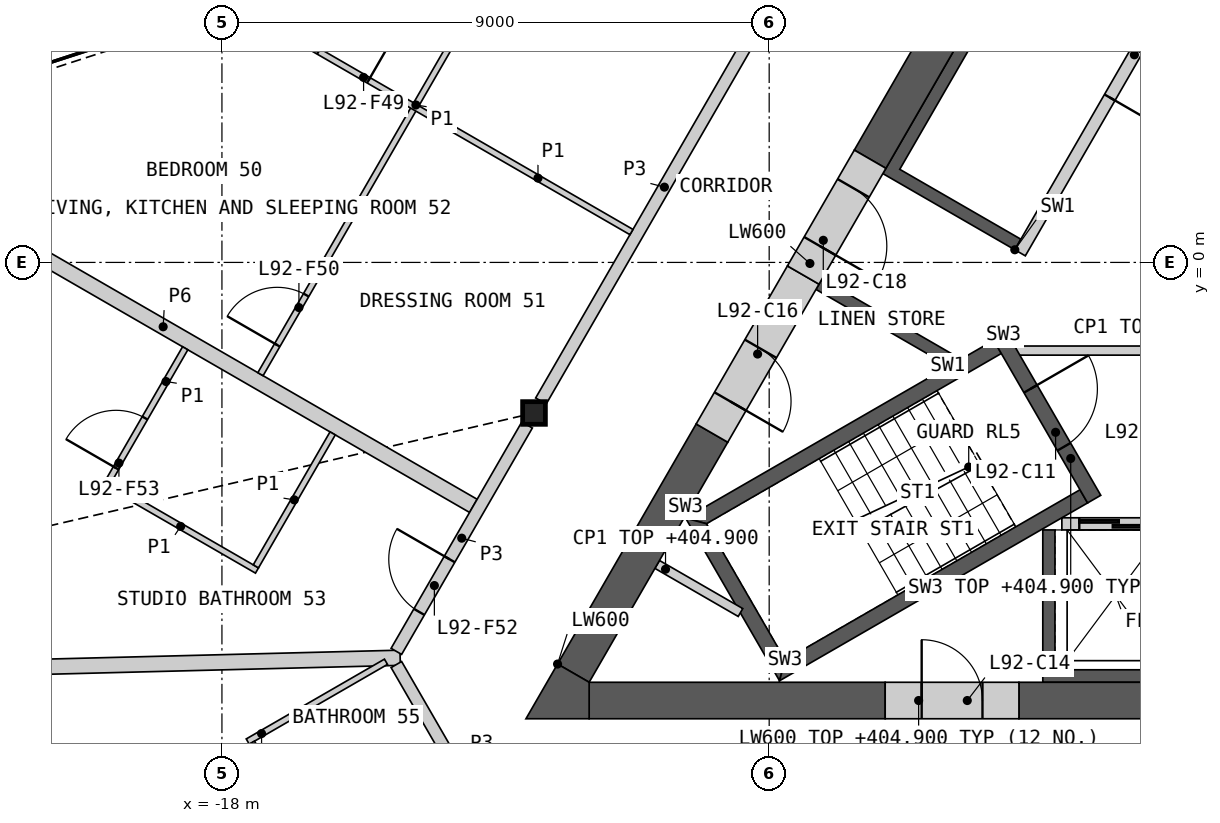
"""IFC4 building model, lengths in metres.
Left out: names, types, materials, properties, quantities, classifications, styles, units other than length and angle.
Written with IfcOpenShell. Run it as: python <this file> out.ifc"""

import sys

from ifc_helpers import new_model, si_unit, direction, frame, frame_2d, origin, origin_2d, place, context, subcontext, project, spatial, polyline, rectangle, i_section, outline, extrude, element, fill, save


model = new_model("IFC4")
c1 = context("Model", 3, precision=1e-05, world=origin(), true_north=direction((0.0, 1.0)))
c2 = subcontext(c1, "Body", "Model", "MODEL_VIEW")
j1 = project(units=[si_unit("LENGTHUNIT", "METRE"), si_unit("PLANEANGLEUNIT", "RADIAN")], contexts=[c1])
p1 = place(None, origin())
s1 = spatial("IfcSite", under=j1, at=p1, CompositionType="ELEMENT")
p2 = place(p1, origin())
s2 = spatial("IfcBuilding", under=s1, at=p2, CompositionType="ELEMENT")
p3 = place(p2, frame((0.0, 0.0, 401.8)))
s3 = spatial("IfcBuildingStorey", under=s2, at=p3, CompositionType="ELEMENT", Elevation=401.8)
p4 = place(p3, frame((-12.868, -2.476, 0.0), z_axis=(0.0, 0.0, 1.0), x_axis=(1.0, 0.0, 0.0)))
e1 = element("IfcColumn", 1, at=p4, inside=s3, PredefinedType="COLUMN", context=c2, shape_type="SweptSolid", body=[
    extrude(i_section(OverallWidth=0.374, OverallDepth=0.372, WebThickness=0.016, FlangeThickness=0.026, at=origin_2d()), origin(), (0.0, 0.0, 1.0), 3.4),
])
p5 = place(p3, origin())
e2 = element("IfcWall", 2, at=p5, inside=s3, PredefinedType="SHEAR", context=c2, shape_type="SweptSolid", body=[
    extrude(outline(polyline([(4.5, -4.4), (4.5, -6.906), (-4.5, -6.906), (-4.5, -4.4), (-4.3, -4.4), (-4.3, -6.7), (-2.3, -6.7), (-2.3, -4.4), (-2.1, -4.4), (-2.1, -6.7), (-0.1, -6.7), (-0.1, -4.4), (0.1, -4.4), (0.1, -6.7), (2.1, -6.7), (2.1, -4.4), (2.3, -4.4), (2.3, -6.7), (4.3, -6.7), (4.3, -4.4), (4.5, -4.4)])), origin(), (0.0, 0.0, 1.0), 3.1),
])
p6 = place(p3, frame((-4.187, -4.3, 0.0), z_axis=(0.0, 0.0, 1.0), x_axis=(1.0, 0.0, 0.0)))
e3 = element("IfcWall", 3, at=p6, inside=s3, PredefinedType="SOLIDWALL", context=c2, shape_type="SweptSolid", body=[
    extrude(rectangle(XDim=8.373, YDim=0.2, at=frame_2d((4.187, 0.0))), origin(), (0.0, 0.0, 1.0), 3.1),
])
p7 = place(p6, frame((0.287, 0.0, 0.0)))
e4 = element("IfcOpeningElement", 4, at=p7, cuts=e3, PredefinedType="OPENING", context=c2, shape_type="SweptSolid", body=[
    extrude(rectangle(XDim=1.2, YDim=2.1, at=frame_2d((0.6, 1.05))), frame((0.0, 0.11, 0.0), z_axis=(0.0, -1.0, 0.0), x_axis=(1.0, 0.0, 0.0)), (0.0, 0.0, 1.0), 0.22),
])
p8 = place(p6, frame((2.387, 0.0, 0.0)))
e5 = element("IfcOpeningElement", 5, at=p8, cuts=e3, PredefinedType="OPENING", context=c2, shape_type="SweptSolid", body=[
    extrude(rectangle(XDim=1.4, YDim=2.1, at=frame_2d((0.7, 1.05))), frame((0.0, 0.11, 0.0), z_axis=(0.0, -1.0, 0.0), x_axis=(1.0, 0.0, 0.0)), (0.0, 0.0, 1.0), 0.22),
])
p9 = place(p6, frame((4.737, 0.0, 0.0)))
e6 = element("IfcOpeningElement", 6, at=p9, cuts=e3, PredefinedType="OPENING", context=c2, shape_type="SweptSolid", body=[
    extrude(rectangle(XDim=1.1, YDim=2.1, at=frame_2d((0.55, 1.05))), frame((0.0, 0.11, 0.0), z_axis=(0.0, -1.0, 0.0), x_axis=(1.0, 0.0, 0.0)), (0.0, 0.0, 1.0), 0.22),
])
p10 = place(p6, frame((6.887, 0.0, 0.0)))
e7 = element("IfcOpeningElement", 7, at=p10, cuts=e3, PredefinedType="OPENING", context=c2, shape_type="SweptSolid", body=[
    extrude(rectangle(XDim=1.2, YDim=2.1, at=frame_2d((0.6, 1.05))), frame((0.0, 0.11, 0.0), z_axis=(0.0, -1.0, 0.0), x_axis=(1.0, 0.0, 0.0)), (0.0, 0.0, 1.0), 0.22),
])
p11 = place(p3, origin())
e8 = element("IfcWall", 8, at=p11, inside=s3, PredefinedType="SHEAR", context=c2, shape_type="SweptSolid", body=[
    extrude(outline(polyline([(-6.061, -1.697), (-8.231, -0.444), (-8.131, -0.271), (-5.96, -1.524), (-6.061, -1.697)])), origin(), (0.0, 0.0, 1.0), 3.1),
])
p12 = place(p3, origin())
e9 = element("IfcWall", 9, at=p12, inside=s3, PredefinedType="SHEAR", context=c2, shape_type="SweptSolid", body=[
    extrude(outline(polyline([(-4.96, 0.208), (-7.131, 1.461), (-3.731, 7.35), (-1.561, 6.097), (-1.66, 5.924), (-3.652, 7.074), (-6.852, 1.531), (-4.861, 0.381), (-4.96, 0.208)])), origin(), (0.0, 0.0, 1.0), 3.1),
])
p13 = place(p3, frame((-1.631, 5.776, 0.0), z_axis=(0.0, 0.0, 1.0), x_axis=(-0.499992876559, -0.866029516466, 0.0)))
e10 = element("IfcWall", 10, at=p13, inside=s3, PredefinedType="SOLIDWALL", context=c2, shape_type="SweptSolid", body=[
    extrude(rectangle(XDim=6.486, YDim=0.2, at=frame_2d((3.243, 0.0))), origin(), (0.0, 0.0, 1.0), 3.1),
])
p14 = place(p13, frame((2.637, 0.0, 0.0)))
e11 = element("IfcOpeningElement", 11, at=p14, cuts=e10, PredefinedType="OPENING", context=c2, shape_type="SweptSolid", body=[
    extrude(rectangle(XDim=0.9, YDim=2.1, at=frame_2d((0.45, 1.05))), frame((0.0, 0.11, 0.0), z_axis=(0.0, -1.0, 0.0), x_axis=(1.0, 0.0, 0.0)), (0.0, 0.0, 1.0), 0.22),
])
p15 = place(p3, frame((-4.941, -1.45, 0.0), z_axis=(0.0, 0.0, 1.0), x_axis=(1.0, 0.0, 0.0)))
e12 = element("IfcWall", 12, at=p15, inside=s3, PredefinedType="PARTITIONING", context=c2, shape_type="SweptSolid", body=[
    extrude(rectangle(XDim=9.882, YDim=0.15, at=frame_2d((4.941, 0.0))), origin(), (0.0, 0.0, 1.0), 3.1),
])
p16 = place(p15, frame((4.391, 0.0, 0.0)))
e13 = element("IfcOpeningElement", 13, at=p16, cuts=e12, PredefinedType="OPENING", context=c2, shape_type="SweptSolid", body=[
    extrude(rectangle(XDim=1.1, YDim=2.1, at=frame_2d((0.55, 1.05))), frame((0.0, 0.085, 0.0), z_axis=(0.0, -1.0, 0.0), x_axis=(1.0, 0.0, 0.0)), (0.0, 0.0, 1.0), 0.17),
])
p17 = place(p3, origin())
e14 = element("IfcWall", 14, at=p17, inside=s3, PredefinedType="SHEAR", context=c2, shape_type="SweptSolid", body=[
    extrude(outline(polyline([(-5.307, -1.281), (-10.374, -4.206), (-10.032, -4.298), (-5.182, -1.498), (-5.307, -1.281)])), origin(), (0.0, 0.0, 1.0), 3.1),
])
p18 = place(p3, origin())
e15 = element("IfcWall", 15, at=p18, inside=s3, PredefinedType="SHEAR", context=c2, shape_type="SweptSolid", body=[
    extrude(outline(polyline([(-10.374, -4.206), (-8.83, -6.881), (-8.738, -6.539), (-10.032, -4.298), (-10.374, -4.206)])), origin(), (0.0, 0.0, 1.0), 3.1),
])
p19 = place(p3, origin())
e16 = element("IfcWall", 16, at=p19, inside=s3, PredefinedType="SHEAR", context=c2, shape_type="SweptSolid", body=[
    extrude(outline(polyline([(-8.738, -6.539), (-8.83, -6.881), (-3.763, -3.956), (-3.888, -3.739), (-8.738, -6.539)])), origin(), (0.0, 0.0, 1.0), 3.1),
])
p20 = place(p3, frame((-5.199, -1.219, 0.0), z_axis=(0.0, 0.0, 1.0), x_axis=(0.499982516597, -0.866035497597, 0.0)))
e17 = element("IfcWall", 17, at=p20, inside=s3, PredefinedType="SHEAR", context=c2, shape_type="SweptSolid", body=[
    extrude(rectangle(XDim=3.088, YDim=0.25, at=frame_2d((1.544, 0.0))), origin(), (0.0, 0.0, 1.0), 3.1),
])
p21 = place(p20, frame((0.994, 0.0, 0.0)))
e18 = element("IfcOpeningElement", 18, at=p21, cuts=e17, PredefinedType="OPENING", context=c2, shape_type="SweptSolid", body=[
    extrude(rectangle(XDim=1.1, YDim=2.1, at=frame_2d((0.55, 1.05))), frame((0.0, 0.135, 0.0), z_axis=(0.0, -1.0, 0.0), x_axis=(1.0, 0.0, 0.0)), (0.0, 0.0, 1.0), 0.27),
])
p22 = place(p3, frame((-10.842, -4.967, 0.0), z_axis=(0.0, 0.0, 1.0), x_axis=(0.866098216386, -0.499873863663, 0.0)))
e19 = element("IfcWall", 19, at=p22, inside=s3, PredefinedType="PARTITIONING", context=c2, shape_type="SweptSolid", body=[
    extrude(rectangle(XDim=1.582, YDim=0.15, at=frame_2d((0.791, 0.0))), origin(), (0.0, 0.0, 1.0), 3.1),
])
p23 = place(p3, frame((-4.892, -7.206, 0.0), z_axis=(0.0, 0.0, 1.0), x_axis=(1.0, 0.0, 0.0)))
e20 = element("IfcWall", 20, at=p23, inside=s3, PredefinedType="SHEAR", context=c2, shape_type="SweptSolid", body=[
    extrude(rectangle(XDim=16.853, YDim=0.6, at=frame_2d((8.426, 0.0))), origin(), (0.0, 0.0, 1.0), 3.1),
])
p24 = place(p3, frame((-11.961, -7.206, 0.0), z_axis=(0.0, 0.0, 1.0), x_axis=(1.0, 0.0, 0.0)))
e21 = element("IfcWall", 21, at=p24, inside=s3, PredefinedType="SHEAR", context=c2, shape_type="SweptSolid", body=[
    extrude(rectangle(XDim=4.868, YDim=0.6, at=frame_2d((2.434, 0.0))), origin(), (0.0, 0.0, 1.0), 3.1),
])
p25 = place(p3, frame((-3.794, 7.84, 0.0), z_axis=(0.0, 0.0, 1.0), x_axis=(-0.499974747889, -0.866039982607, 0.0)))
e22 = element("IfcWall", 22, at=p25, inside=s3, PredefinedType="SHEAR", context=c2, shape_type="SweptSolid", body=[
    extrude(rectangle(XDim=7.092, YDim=0.6, at=frame_2d((3.546, 0.0))), origin(), (0.0, 0.0, 1.0), 3.1),
])
p26 = place(p3, frame((-9.941, -2.807, 0.0), z_axis=(0.0, 0.0, 1.0), x_axis=(-0.500020646047, -0.866013483456, 0.0)))
e23 = element("IfcWall", 23, at=p26, inside=s3, PredefinedType="SHEAR", context=c2, shape_type="SweptSolid", body=[
    extrude(rectangle(XDim=4.559, YDim=0.6, at=frame_2d((2.28, 0.0))), origin(), (0.0, 0.0, 1.0), 3.1),
])
p27 = place(p3, origin())
e24 = element("IfcWall", 24, at=p27, inside=s3, PredefinedType="SHEAR", context=c2, shape_type="SweptSolid", body=[
    extrude(outline(polyline([(-12.48, -6.606), (-11.961, -6.906), (-11.961, -7.506), (-13.0, -7.506), (-12.48, -6.606)])), origin(), (0.0, 0.0, 1.0), 3.1),
])
p28 = place(p3, frame((-7.092, -7.206, 0.0), z_axis=(0.0, 0.0, 1.0), x_axis=(1.0, 0.0, 0.0)))
e25 = element("IfcWall", 25, at=p28, inside=s3, PredefinedType="SHEAR", context=c2, shape_type="SweptSolid", body=[
    extrude(rectangle(XDim=2.2, YDim=0.6, at=frame_2d((1.1, 0.0))), origin(), (0.0, 0.0, 1.0), 3.1),
])
p29 = place(p28, frame((0.6, 0.0, 0.0)))
e26 = element("IfcOpeningElement", 26, at=p29, cuts=e25, PredefinedType="OPENING", context=c2, shape_type="SweptSolid", body=[
    extrude(rectangle(XDim=1.0, YDim=2.1, at=frame_2d((0.5, 1.05))), frame((0.0, 0.31, 0.0), z_axis=(0.0, -1.0, 0.0), x_axis=(1.0, 0.0, 0.0)), (0.0, 0.0, 1.0), 0.62),
])
p30 = place(p3, frame((-8.44, -0.208, 0.0), z_axis=(0.0, 0.0, 1.0), x_axis=(-0.499997052475, -0.866027105532, 0.0)))
e27 = element("IfcWall", 27, at=p30, inside=s3, PredefinedType="SHEAR", context=c2, shape_type="SweptSolid", body=[
    extrude(rectangle(XDim=3.001, YDim=0.6, at=frame_2d((1.501, 0.0))), origin(), (0.0, 0.0, 1.0), 3.1),
])
p31 = place(p30, frame((1.4, 0.0, 0.0)))
e28 = element("IfcOpeningElement", 28, at=p31, cuts=e27, PredefinedType="OPENING", context=c2, shape_type="SweptSolid", body=[
    extrude(rectangle(XDim=1.0, YDim=2.1, at=frame_2d((0.5, 1.05))), frame((0.0, 0.31, 0.0), z_axis=(0.0, -1.0, 0.0), x_axis=(1.0, 0.0, 0.0)), (0.0, 0.0, 1.0), 0.62),
])
p32 = place(p3, frame((-7.34, 1.698, 0.0), z_axis=(0.0, 0.0, 1.0), x_axis=(-0.50002983664, -0.866008176907, 0.0)))
e29 = element("IfcWall", 29, at=p32, inside=s3, PredefinedType="SHEAR", context=c2, shape_type="SweptSolid", body=[
    extrude(rectangle(XDim=2.2, YDim=0.6, at=frame_2d((1.1, 0.0))), origin(), (0.0, 0.0, 1.0), 3.1),
])
p33 = place(p32, frame((0.55, 0.0, 0.0)))
e30 = element("IfcOpeningElement", 30, at=p33, cuts=e29, PredefinedType="OPENING", context=c2, shape_type="SweptSolid", body=[
    extrude(rectangle(XDim=1.1, YDim=2.1, at=frame_2d((0.55, 1.05))), frame((0.0, 0.31, 0.0), z_axis=(0.0, -1.0, 0.0), x_axis=(1.0, 0.0, 0.0)), (0.0, 0.0, 1.0), 0.62),
])
p34 = place(p3, frame((-29.269, -6.862, 0.0), z_axis=(0.0, 0.0, 1.0), x_axis=(0.999679020594, 0.025334872878, 0.0)))
e31 = element("IfcWall", 31, at=p34, inside=s3, PredefinedType="PARTITIONING", context=c2, shape_type="SweptSolid", body=[
    extrude(rectangle(XDim=14.204, YDim=0.25, at=frame_2d((7.102, 0.0))), origin(), (0.0, 0.0, 1.0), 2.33),
])
p35 = place(p3, frame((-24.069, 1.887, 0.0), z_axis=(0.0, 0.0, 1.0), x_axis=(0.866023404247, -0.500003463284, 0.0)))
e32 = element("IfcWall", 32, at=p35, inside=s3, PredefinedType="PARTITIONING", context=c2, shape_type="SweptSolid", body=[
    extrude(rectangle(XDim=11.782, YDim=0.25, at=frame_2d((5.891, 0.0))), origin(), (0.0, 0.0, 1.0), 2.33),
])
p36 = place(p3, frame((-12.754, -2.279, 0.0), z_axis=(0.0, 0.0, 1.0), x_axis=(0.500001682468, 0.866024432409, 0.0)))
e33 = element("IfcWall", 33, at=p36, inside=s3, PredefinedType="PARTITIONING", context=c2, shape_type="SweptSolid", body=[
    extrude(rectangle(XDim=8.124, YDim=0.2, at=frame_2d((4.062, 0.0))), origin(), (0.0, 0.0, 1.0), 3.1),
])
p37 = place(p3, frame((-15.131, -6.397, 0.0), z_axis=(0.0, 0.0, 1.0), x_axis=(0.499986217557, 0.866033360935, 0.0)))
e34 = element("IfcWall", 34, at=p37, inside=s3, PredefinedType="PARTITIONING", context=c2, shape_type="SweptSolid", body=[
    extrude(rectangle(XDim=4.3, YDim=0.2, at=frame_2d((2.15, 0.0))), origin(), (0.0, 0.0, 1.0), 3.1),
])
p38 = place(p37, frame((0.75, 0.0, 0.0)))
e35 = element("IfcOpeningElement", 35, at=p38, cuts=e34, PredefinedType="OPENING", context=c2, shape_type="SweptSolid", body=[
    extrude(rectangle(XDim=1.0, YDim=2.1, at=frame_2d((0.5, 1.05))), frame((0.0, 0.11, 0.0), z_axis=(0.0, -1.0, 0.0), x_axis=(1.0, 0.0, 0.0)), (0.0, 0.0, 1.0), 0.22),
])
p39 = place(p3, frame((-15.131, -6.614, 0.0), z_axis=(0.0, 0.0, 1.0), x_axis=(0.499967746641, -0.866044024469, 0.0)))
e36 = element("IfcWall", 36, at=p39, inside=s3, PredefinedType="PARTITIONING", context=c2, shape_type="SweptSolid", body=[
    extrude(rectangle(XDim=3.676, YDim=0.2, at=frame_2d((1.838, 0.0))), origin(), (0.0, 0.0, 1.0), 3.1),
])
p40 = place(p39, frame((2.426, 0.0, 0.0)))
e37 = element("IfcOpeningElement", 37, at=p40, cuts=e36, PredefinedType="OPENING", context=c2, shape_type="SweptSolid", body=[
    extrude(rectangle(XDim=1.0, YDim=2.1, at=frame_2d((0.5, 1.05))), frame((0.0, 0.11, 0.0), z_axis=(0.0, -1.0, 0.0), x_axis=(1.0, 0.0, 0.0)), (0.0, 0.0, 1.0), 0.22),
])
p41 = place(p3, frame((-17.366, -1.838, 0.0), z_axis=(0.0, 0.0, 1.0), x_axis=(0.499998717582, 0.866026144187, 0.0)))
e38 = element("IfcWall", 38, at=p41, inside=s3, PredefinedType="PARTITIONING", context=c2, shape_type="SweptSolid", body=[
    extrude(rectangle(XDim=10.225, YDim=0.1, at=frame_2d((5.113, 0.0))), origin(), (0.0, 0.0, 1.0), 2.33),
])
p42 = place(p41, frame((6.907, 0.0, 0.0)))
e39 = element("IfcOpeningElement", 39, at=p42, cuts=e38, PredefinedType="OPENING", context=c2, shape_type="SweptSolid", body=[
    extrude(rectangle(XDim=0.95, YDim=2.1, at=frame_2d((0.475, 1.05))), frame((0.0, 0.06, 0.0), z_axis=(0.0, -1.0, 0.0), x_axis=(1.0, 0.0, 0.0)), (0.0, 0.0, 1.0), 0.12),
])
p43 = place(p41, frame((0.552, 0.0, 0.0)))
e40 = element("IfcOpeningElement", 40, at=p43, cuts=e38, PredefinedType="OPENING", context=c2, shape_type="SweptSolid", body=[
    extrude(rectangle(XDim=0.95, YDim=2.1, at=frame_2d((0.475, 1.05))), frame((0.0, 0.06, 0.0), z_axis=(0.0, -1.0, 0.0), x_axis=(1.0, 0.0, 0.0)), (0.0, 0.0, 1.0), 0.12),
])
p44 = place(p3, frame((-17.414, 4.049, 0.0), z_axis=(0.0, 0.0, 1.0), x_axis=(0.866033839264, -0.499985389037, 0.0)))
e41 = element("IfcWall", 41, at=p44, inside=s3, PredefinedType="PARTITIONING", context=c2, shape_type="SweptSolid", body=[
    extrude(rectangle(XDim=7.1, YDim=0.1, at=frame_2d((3.55, 0.0))), origin(), (0.0, 0.0, 1.0), 2.33),
])
p45 = place(p44, frame((1.158, 0.0, 0.0)))
e42 = element("IfcOpeningElement", 42, at=p45, cuts=e41, PredefinedType="OPENING", context=c2, shape_type="SweptSolid", body=[
    extrude(rectangle(XDim=0.95, YDim=2.1, at=frame_2d((0.475, 1.05))), frame((0.0, 0.06, 0.0), z_axis=(0.0, -1.0, 0.0), x_axis=(1.0, 0.0, 0.0)), (0.0, 0.0, 1.0), 0.12),
])
p46 = place(p3, frame((-19.935, -3.617, 0.0), z_axis=(0.0, 0.0, 1.0), x_axis=(0.866032775405, -0.499987231761, 0.0)))
e43 = element("IfcWall", 43, at=p46, inside=s3, PredefinedType="PARTITIONING", context=c2, shape_type="SweptSolid", body=[
    extrude(rectangle(XDim=2.9, YDim=0.1, at=frame_2d((1.45, 0.0))), origin(), (0.0, 0.0, 1.0), 2.33),
])
p47 = place(p3, frame((-17.442, -4.999, 0.0), z_axis=(0.0, 0.0, 1.0), x_axis=(0.499976333282, 0.866039067339, 0.0)))
e44 = element("IfcWall", 44, at=p47, inside=s3, PredefinedType="PARTITIONING", context=c2, shape_type="SweptSolid", body=[
    extrude(rectangle(XDim=2.525, YDim=0.1, at=frame_2d((1.262, 0.0))), origin(), (0.0, 0.0, 1.0), 2.33),
])
p48 = place(p3, frame((-19.867, -3.599, 0.0), z_axis=(0.0, 0.0, 1.0), x_axis=(0.500048846702, 0.865997200291, 0.0)))
e45 = element("IfcWall", 45, at=p48, inside=s3, PredefinedType="PARTITIONING", context=c2, shape_type="SweptSolid", body=[
    extrude(rectangle(XDim=2.525, YDim=0.1, at=frame_2d((1.263, 0.0))), origin(), (0.0, 0.0, 1.0), 2.33),
])
p49 = place(p48, frame((0.25, 0.0, 0.0)))
e46 = element("IfcOpeningElement", 46, at=p49, cuts=e45, PredefinedType="OPENING", context=c2, shape_type="SweptSolid", body=[
    extrude(rectangle(XDim=0.95, YDim=2.1, at=frame_2d((0.475, 1.05))), frame((0.0, 0.06, 0.0), z_axis=(0.0, -1.0, 0.0), x_axis=(1.0, 0.0, 0.0)), (0.0, 0.0, 1.0), 0.12),
])
p50 = place(p3, frame((-17.575, -7.881, 0.0), z_axis=(0.0, 0.0, 1.0), x_axis=(0.866013657776, 0.500020344131, 0.0)))
e47 = element("IfcWall", 47, at=p50, inside=s3, PredefinedType="PARTITIONING", context=c2, shape_type="SweptSolid", body=[
    extrude(rectangle(XDim=2.625, YDim=0.1, at=frame_2d((1.312, 0.0))), origin(), (0.0, 0.0, 1.0), 2.33),
])
p51 = place(p3, frame((-17.507, -7.899, 0.0), z_axis=(0.0, 0.0, 1.0), x_axis=(0.499972416139, -0.866041328748, 0.0)))
e48 = element("IfcWall", 48, at=p51, inside=s3, PredefinedType="PARTITIONING", context=c2, shape_type="SweptSolid", body=[
    extrude(rectangle(XDim=1.973, YDim=0.1, at=frame_2d((0.986, 0.0))), origin(), (0.0, 0.0, 1.0), 2.33),
])
p52 = place(p7, origin())
e49 = element("IfcDoor", 49, at=p52, inside=s3, OperationType="SLIDING_TO_LEFT", PredefinedType="DOOR", context=c2, shape_type="SweptSolid", body=[
    extrude(rectangle(XDim=1.2, YDim=2.1, at=frame_2d((0.6, 1.05))), frame((0.0, 0.025, 0.0), z_axis=(0.0, -1.0, 0.0), x_axis=(1.0, 0.0, 0.0)), (0.0, 0.0, 1.0), 0.05),
])
fill(e4, e49)
p53 = place(p14, origin())
e50 = element("IfcDoor", 50, at=p53, inside=s3, OperationType="SINGLE_SWING_RIGHT", PredefinedType="DOOR", context=c2, shape_type="SweptSolid", body=[
    extrude(rectangle(XDim=0.9, YDim=2.1, at=frame_2d((0.45, 1.05))), frame((0.0, 0.025, 0.0), z_axis=(0.0, -1.0, 0.0), x_axis=(1.0, 0.0, 0.0)), (0.0, 0.0, 1.0), 0.05),
])
fill(e11, e50)
p54 = place(p21, origin())
e51 = element("IfcDoor", 51, at=p54, inside=s3, OperationType="SINGLE_SWING_LEFT", PredefinedType="DOOR", context=c2, shape_type="SweptSolid", body=[
    extrude(rectangle(XDim=1.1, YDim=2.1, at=frame_2d((0.55, 1.05))), frame((0.0, 0.025, 0.0), z_axis=(0.0, -1.0, 0.0), x_axis=(1.0, 0.0, 0.0)), (0.0, 0.0, 1.0), 0.05),
])
fill(e18, e51)
p55 = place(p29, origin())
e52 = element("IfcDoor", 52, at=p55, inside=s3, OperationType="SINGLE_SWING_LEFT", PredefinedType="DOOR", context=c2, shape_type="SweptSolid", body=[
    extrude(rectangle(XDim=1.0, YDim=2.1, at=frame_2d((0.5, 1.05))), frame((0.0, 0.055, 0.0), z_axis=(0.0, -1.0, 0.0), x_axis=(1.0, 0.0, 0.0)), (0.0, 0.0, 1.0), 0.05),
])
fill(e26, e52)
p56 = place(p31, origin())
e53 = element("IfcDoor", 53, at=p56, inside=s3, OperationType="SINGLE_SWING_RIGHT", PredefinedType="DOOR", context=c2, shape_type="SweptSolid", body=[
    extrude(rectangle(XDim=1.0, YDim=2.1, at=frame_2d((0.5, 1.05))), frame((0.0, 0.055, 0.0), z_axis=(0.0, -1.0, 0.0), x_axis=(1.0, 0.0, 0.0)), (0.0, 0.0, 1.0), 0.05),
])
fill(e28, e53)
p57 = place(p33, origin())
e54 = element("IfcDoor", 54, at=p57, inside=s3, OperationType="SINGLE_SWING_RIGHT", PredefinedType="DOOR", context=c2, shape_type="SweptSolid", body=[
    extrude(rectangle(XDim=1.1, YDim=2.1, at=frame_2d((0.55, 1.05))), frame((0.0, 0.055, 0.0), z_axis=(0.0, -1.0, 0.0), x_axis=(1.0, 0.0, 0.0)), (0.0, 0.0, 1.0), 0.05),
])
fill(e30, e54)
p58 = place(p45, origin())
e55 = element("IfcDoor", 55, at=p58, inside=s3, OperationType="SINGLE_SWING_RIGHT", PredefinedType="DOOR", context=c2, shape_type="SweptSolid", body=[
    extrude(rectangle(XDim=0.95, YDim=2.1, at=frame_2d((0.475, 1.05))), frame((0.0, 0.025, 0.0), z_axis=(0.0, -1.0, 0.0), x_axis=(1.0, 0.0, 0.0)), (0.0, 0.0, 1.0), 0.05),
])
fill(e42, e55)
p59 = place(p43, origin())
e56 = element("IfcDoor", 56, at=p59, inside=s3, OperationType="SINGLE_SWING_LEFT", PredefinedType="DOOR", context=c2, shape_type="SweptSolid", body=[
    extrude(rectangle(XDim=0.95, YDim=2.1, at=frame_2d((0.475, 1.05))), frame((0.0, 0.025, 0.0), z_axis=(0.0, -1.0, 0.0), x_axis=(1.0, 0.0, 0.0)), (0.0, 0.0, 1.0), 0.05),
])
fill(e40, e56)
p60 = place(p38, origin())
e57 = element("IfcDoor", 57, at=p60, inside=s3, OperationType="SINGLE_SWING_RIGHT", PredefinedType="DOOR", context=c2, shape_type="SweptSolid", body=[
    extrude(rectangle(XDim=1.0, YDim=2.1, at=frame_2d((0.5, 1.05))), frame((0.0, 0.025, 0.0), z_axis=(0.0, -1.0, 0.0), x_axis=(1.0, 0.0, 0.0)), (0.0, 0.0, 1.0), 0.05),
])
fill(e35, e57)
p61 = place(p49, origin())
e58 = element("IfcDoor", 58, at=p61, inside=s3, OperationType="SINGLE_SWING_LEFT", PredefinedType="DOOR", context=c2, shape_type="SweptSolid", body=[
    extrude(rectangle(XDim=0.95, YDim=2.1, at=frame_2d((0.475, 1.05))), frame((0.0, 0.025, 0.0), z_axis=(0.0, -1.0, 0.0), x_axis=(1.0, 0.0, 0.0)), (0.0, 0.0, 1.0), 0.05),
])
fill(e46, e58)
save(model, sys.argv[1])
